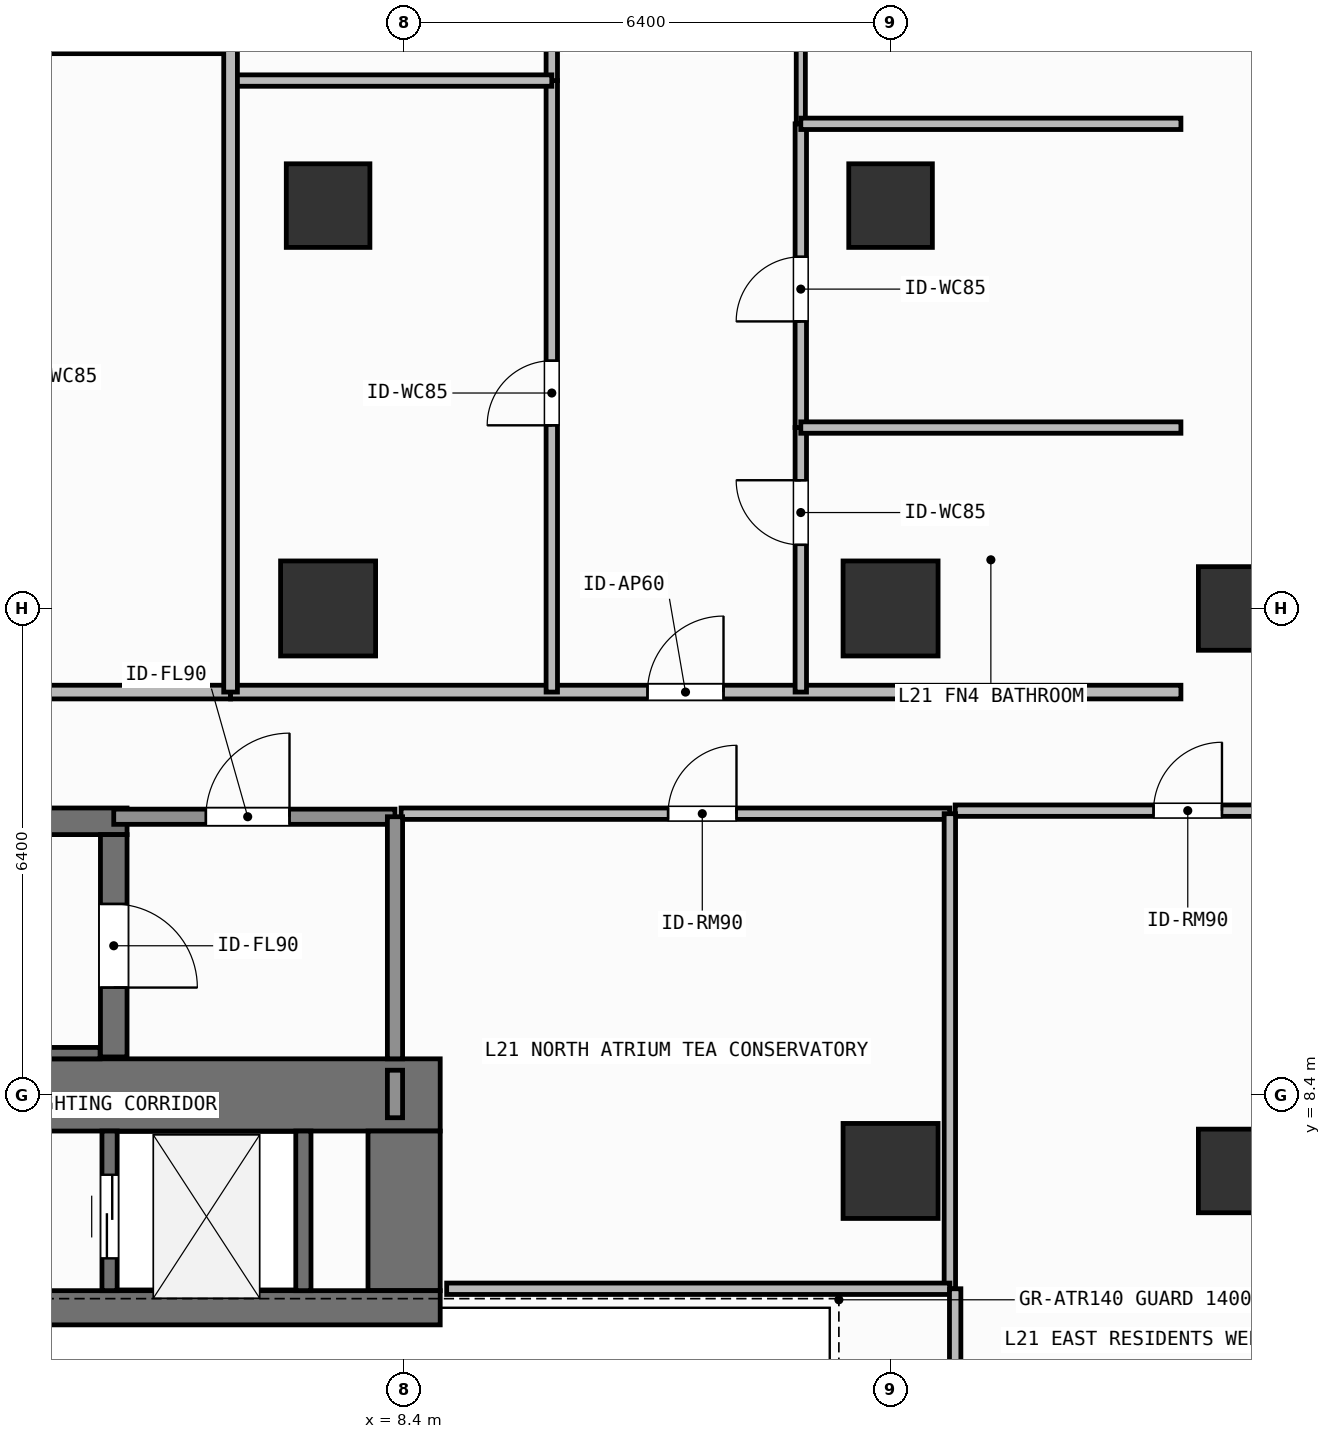
"""IFC4 building model, lengths in metres.
Left out: names, types, materials, properties, quantities, classifications, styles, units other than length and angle.
Written with IfcOpenShell. Run it as: python <this file> out.ifc"""

import sys

from ifc_helpers import new_model, si_unit, direction, frame, frame_2d, origin, origin_2d, place, context, subcontext, project, spatial, rectangle, extrude, element, fill, save


model = new_model("IFC4")
c1 = context("Model", 3, precision=1e-05, world=origin(), true_north=direction((0.0, 1.0)))
c2 = subcontext(c1, "Body", "Model", "MODEL_VIEW")
j1 = project(units=[si_unit("LENGTHUNIT", "METRE"), si_unit("PLANEANGLEUNIT", "RADIAN")], contexts=[c1])
p1 = place(None, origin())
s1 = spatial("IfcSite", under=j1, at=p1, CompositionType="ELEMENT")
p2 = place(p1, origin())
s2 = spatial("IfcBuilding", under=s1, at=p2, CompositionType="ELEMENT")
p3 = place(p2, frame((0.0, 0.0, 85.2)))
s3 = spatial("IfcBuildingStorey", under=s2, at=p3, CompositionType="ELEMENT", Elevation=85.2)
p4 = place(p3, frame((-7.55, 8.4, 0.0), z_axis=(0.0, 0.0, 1.0), x_axis=(1.0, 0.0, 0.0)))
e1 = element("IfcWall", 1, at=p4, inside=s3, PredefinedType="SHEAR", context=c2, shape_type="SweptSolid", body=[
    extrude(rectangle(XDim=16.425, YDim=0.95, at=frame_2d((8.212, 0.0))), origin(), (0.0, 0.0, 1.0), 3.9),
])
p5 = place(p3, frame((8.4, 5.825, 0.0), z_axis=(0.0, 0.0, 1.0), x_axis=(0.0, 1.0, 0.0)))
e2 = element("IfcWall", 2, at=p5, inside=s3, PredefinedType="SHEAR", context=c2, shape_type="SweptSolid", body=[
    extrude(rectangle(XDim=2.1, YDim=0.95, at=frame_2d((1.05, 0.0))), origin(), (0.0, 0.0, 1.0), 3.9),
])
p6 = place(p3, frame((3.045, 5.6, 0.0), z_axis=(0.0, 0.0, 1.0), x_axis=(1.0, 0.0, 0.0)))
e3 = element("IfcWall", 3, at=p6, inside=s3, PredefinedType="SHEAR", context=c2, shape_type="SweptSolid", body=[
    extrude(rectangle(XDim=5.83, YDim=0.45, at=frame_2d((2.915, 0.0))), origin(), (0.0, 0.0, 1.0), 3.9),
])
p7 = place(p3, frame((-2.555, 12.0, 0.0), z_axis=(0.0, 0.0, 1.0), x_axis=(1.0, 0.0, 0.0)))
e4 = element("IfcWall", 4, at=p7, inside=s3, PredefinedType="SHEAR", context=c2, shape_type="SweptSolid", body=[
    extrude(rectangle(XDim=7.31, YDim=0.35, at=frame_2d((3.655, 0.0))), origin(), (0.0, 0.0, 1.0), 3.9),
])
p8 = place(p3, frame((-2.2, 8.95, 0.0), z_axis=(0.0, 0.0, 1.0), x_axis=(1.0, 0.0, 0.0)))
e5 = element("IfcWall", 5, at=p8, inside=s3, PredefinedType="SHEAR", context=c2, shape_type="SweptSolid", body=[
    extrude(rectangle(XDim=6.6, YDim=0.15, at=frame_2d((3.3, 0.0))), origin(), (0.0, 0.0, 1.0), 3.9),
])
p9 = place(p3, frame((4.58, 11.825, 0.0), z_axis=(0.0, 0.0, 1.0), x_axis=(0.0, -1.0, 0.0)))
e6 = element("IfcWall", 6, at=p9, inside=s3, PredefinedType="SHEAR", context=c2, shape_type="SweptSolid", body=[
    extrude(rectangle(XDim=2.925, YDim=0.35, at=frame_2d((1.462, 0.0))), origin(), (0.0, 0.0, 1.0), 3.9),
])
p10 = place(p9, frame((0.913, 0.0, 0.0)))
e7 = element("IfcOpeningElement", 7, at=p10, cuts=e6, PredefinedType="OPENING", context=c2, shape_type="SweptSolid", body=[
    extrude(rectangle(XDim=1.1, YDim=2.15, at=frame_2d((0.55, 1.075))), frame((0.0, 0.185, 0.0), z_axis=(0.0, -1.0, 0.0), x_axis=(1.0, 0.0, 0.0)), (0.0, 0.0, 1.0), 0.37),
])
for number, where, z_axis, x_axis in (
    (8, (7.4, 14.8, 0.0), (0.0, 0.0, 1.0), (1.0, 0.0, 0.0)),
    (9, (14.8, 14.8, 0.0), (0.0, 0.0, 1.0), (1.0, 0.0, 0.0)),
    (10, (14.8, 7.4, 0.0), (0.0, 0.0, 1.0), (1.0, 0.0, 0.0)),
):
    element("IfcColumn", number, at=place(p3, frame(where, z_axis=z_axis, x_axis=x_axis)), inside=s3, PredefinedType="COLUMN", context=c2, shape_type="SweptSolid", body=[
        extrude(rectangle(XDim=1.25, YDim=1.25, at=origin_2d()), origin(), (0.0, 0.0, 1.0), 3.9),
    ])
for number, where, z_axis, x_axis in (
    (11, (19.4, 7.4, 0.0), (0.0, 0.0, 1.0), (1.0, 0.0, 0.0)),
    (12, (19.4, 14.8, 0.0), (0.0, 0.0, 1.0), (1.0, 0.0, 0.0)),
    (13, (7.4, 20.1, 0.0), (0.0, 0.0, 1.0), (1.0, 0.0, 0.0)),
    (14, (14.8, 20.1, 0.0), (0.0, 0.0, 1.0), (1.0, 0.0, 0.0)),
):
    element("IfcColumn", number, at=place(p3, frame(where, z_axis=z_axis, x_axis=x_axis)), inside=s3, PredefinedType="COLUMN", context=c2, shape_type="SweptSolid", body=[
        extrude(rectangle(XDim=1.1, YDim=1.1, at=origin_2d()), origin(), (0.0, 0.0, 1.0), 3.9),
    ])
p11 = place(p3, frame((4.525, 5.825, 0.0), z_axis=(0.0, 0.0, 1.0), x_axis=(0.0, 1.0, 0.0)))
e15 = element("IfcWall", 15, at=p11, inside=s3, PredefinedType="SHEAR", context=c2, shape_type="SweptSolid", body=[
    extrude(rectangle(XDim=2.1, YDim=0.2, at=frame_2d((1.05, 0.0))), origin(), (0.0, 0.0, 1.0), 3.68),
])
p12 = place(p11, frame((0.425, 0.0, 0.0)))
e16 = element("IfcOpeningElement", 16, at=p12, cuts=e15, PredefinedType="OPENING", context=c2, shape_type="SweptSolid", body=[
    extrude(rectangle(XDim=1.1, YDim=2.2, at=frame_2d((0.55, 1.1))), frame((0.0, 0.11, 0.0), z_axis=(0.0, -1.0, 0.0), x_axis=(1.0, 0.0, 0.0)), (0.0, 0.0, 1.0), 0.22),
])
p13 = place(p3, frame((7.075, 5.825, 0.0), z_axis=(0.0, 0.0, 1.0), x_axis=(0.0, 1.0, 0.0)))
e17 = element("IfcWall", 17, at=p13, inside=s3, PredefinedType="SHEAR", context=c2, shape_type="SweptSolid", body=[
    extrude(rectangle(XDim=2.1, YDim=0.2, at=frame_2d((1.05, 0.0))), origin(), (0.0, 0.0, 1.0), 3.68),
])
p14 = place(p3, frame((4.58, 12.06, 0.0), z_axis=(0.0, 0.0, 1.0), x_axis=(1.0, 0.0, 0.0)))
e18 = element("IfcWall", 18, at=p14, inside=s3, PredefinedType="SOLIDWALL", context=c2, shape_type="SweptSolid", body=[
    extrude(rectangle(XDim=3.7, YDim=0.2, at=frame_2d((1.85, 0.0))), origin(), (0.0, 0.0, 1.0), 3.68),
])
p15 = place(p14, frame((1.212, 0.0, 0.0)))
e19 = element("IfcOpeningElement", 19, at=p15, cuts=e18, PredefinedType="OPENING", context=c2, shape_type="SweptSolid", body=[
    extrude(rectangle(XDim=1.1, YDim=2.15, at=frame_2d((0.55, 1.075))), frame((0.0, 0.11, 0.0), z_axis=(0.0, -1.0, 0.0), x_axis=(1.0, 0.0, 0.0)), (0.0, 0.0, 1.0), 0.22),
])
p16 = place(p3, frame((8.36, 12.1, 0.0), z_axis=(0.0, 0.0, 1.0), x_axis=(1.0, 0.0, 0.0)))
e20 = element("IfcWall", 20, at=p16, inside=s3, PredefinedType="PARTITIONING", context=c2, shape_type="SweptSolid", body=[
    extrude(rectangle(XDim=7.22, YDim=0.15, at=frame_2d((3.61, 0.0))), origin(), (0.0, 0.0, 1.0), 3.68),
])
p17 = place(p16, frame((3.513, 0.0, 0.0)))
e21 = element("IfcOpeningElement", 21, at=p17, cuts=e20, PredefinedType="OPENING", context=c2, shape_type="SweptSolid", body=[
    extrude(rectangle(XDim=0.9, YDim=2.1, at=frame_2d((0.45, 1.05))), frame((0.0, 0.085, 0.0), z_axis=(0.0, -1.0, 0.0), x_axis=(1.0, 0.0, 0.0)), (0.0, 0.0, 1.0), 0.17),
])
p18 = place(p3, frame((-2.9, 13.7, 0.0), z_axis=(0.0, 0.0, 1.0), x_axis=(1.0, 0.0, 0.0)))
e22 = element("IfcWall", 22, at=p18, inside=s3, PredefinedType="PARTITIONING", context=c2, shape_type="SweptSolid", body=[
    extrude(rectangle(XDim=9.017, YDim=0.18, at=frame_2d((4.508, 0.0))), origin(), (0.0, 0.0, 1.0), 3.68),
])
p19 = place(p18, frame((1.234, 0.0, 0.0)))
e23 = element("IfcOpeningElement", 23, at=p19, cuts=e22, PredefinedType="OPENING", context=c2, shape_type="SweptSolid", body=[
    extrude(rectangle(XDim=1.0, YDim=2.2, at=frame_2d((0.5, 1.1))), frame((0.0, 0.1, 0.0), z_axis=(0.0, -1.0, 0.0), x_axis=(1.0, 0.0, 0.0)), (0.0, 0.0, 1.0), 0.2),
])
p20 = place(p3, frame((6.117, 13.7, 0.0), z_axis=(0.0, 0.0, 1.0), x_axis=(1.0, 0.0, 0.0)))
e24 = element("IfcWall", 24, at=p20, inside=s3, PredefinedType="PARTITIONING", context=c2, shape_type="SweptSolid", body=[
    extrude(rectangle(XDim=12.503, YDim=0.18, at=frame_2d((6.251, 0.0))), origin(), (0.0, 0.0, 1.0), 3.68),
])
p21 = place(p20, frame((5.485, 0.0, 0.0)))
e25 = element("IfcOpeningElement", 25, at=p21, cuts=e24, PredefinedType="OPENING", context=c2, shape_type="SweptSolid", body=[
    extrude(rectangle(XDim=1.0, YDim=2.2, at=frame_2d((0.5, 1.1))), frame((0.0, 0.1, 0.0), z_axis=(0.0, -1.0, 0.0), x_axis=(1.0, 0.0, 0.0)), (0.0, 0.0, 1.0), 0.2),
])
p22 = place(p3, frame((10.343, 13.7, 0.0), z_axis=(0.0, 0.0, 1.0), x_axis=(0.0, 1.0, 0.0)))
e26 = element("IfcWall", 26, at=p22, inside=s3, PredefinedType="PARTITIONING", context=c2, shape_type="SweptSolid", body=[
    extrude(rectangle(XDim=8.045, YDim=0.15, at=frame_2d((4.022, 0.0))), origin(), (0.0, 0.0, 1.0), 3.68),
])
p23 = place(p22, frame((3.51, 0.0, 0.0)))
e27 = element("IfcOpeningElement", 27, at=p23, cuts=e26, PredefinedType="OPENING", context=c2, shape_type="SweptSolid", body=[
    extrude(rectangle(XDim=0.85, YDim=2.1, at=frame_2d((0.425, 1.05))), frame((0.0, 0.085, 0.0), z_axis=(0.0, -1.0, 0.0), x_axis=(1.0, 0.0, 0.0)), (0.0, 0.0, 1.0), 0.17),
])
p24 = place(p3, frame((10.343, 21.745, 0.0), z_axis=(0.0, 0.0, 1.0), x_axis=(0.0, 1.0, 0.0)))
e28 = element("IfcWall", 28, at=p24, inside=s3, PredefinedType="PARTITIONING", context=c2, shape_type="SweptSolid", body=[
    extrude(rectangle(XDim=4.845, YDim=0.15, at=frame_2d((2.422, 0.0))), origin(), (0.0, 0.0, 1.0), 3.68),
])
p25 = place(p24, frame((1.91, 0.0, 0.0)))
e29 = element("IfcOpeningElement", 29, at=p25, cuts=e28, PredefinedType="OPENING", context=c2, shape_type="SweptSolid", body=[
    extrude(rectangle(XDim=0.85, YDim=2.1, at=frame_2d((0.425, 1.05))), frame((0.0, 0.085, 0.0), z_axis=(0.0, -1.0, 0.0), x_axis=(1.0, 0.0, 0.0)), (0.0, 0.0, 1.0), 0.17),
])
p26 = place(p3, frame((13.619, 13.7, 0.0), z_axis=(0.0, 0.0, 1.0), x_axis=(0.0, 1.0, 0.0)))
e30 = element("IfcWall", 30, at=p26, inside=s3, PredefinedType="PARTITIONING", context=c2, shape_type="SweptSolid", body=[
    extrude(rectangle(XDim=3.48, YDim=0.15, at=frame_2d((1.74, 0.0))), origin(), (0.0, 0.0, 1.0), 3.68),
])
p27 = place(p26, frame((1.937, 0.0, 0.0)))
e31 = element("IfcOpeningElement", 31, at=p27, cuts=e30, PredefinedType="OPENING", context=c2, shape_type="SweptSolid", body=[
    extrude(rectangle(XDim=0.85, YDim=2.1, at=frame_2d((0.425, 1.05))), frame((0.0, 0.085, 0.0), z_axis=(0.0, -1.0, 0.0), x_axis=(1.0, 0.0, 0.0)), (0.0, 0.0, 1.0), 0.17),
])
p28 = place(p3, frame((13.619, 17.18, 0.0), z_axis=(0.0, 0.0, 1.0), x_axis=(0.0, 1.0, 0.0)))
e32 = element("IfcWall", 32, at=p28, inside=s3, PredefinedType="PARTITIONING", context=c2, shape_type="SweptSolid", body=[
    extrude(rectangle(XDim=3.996, YDim=0.15, at=frame_2d((1.998, 0.0))), origin(), (0.0, 0.0, 1.0), 3.68),
])
p29 = place(p28, frame((1.396, 0.0, 0.0)))
e33 = element("IfcOpeningElement", 33, at=p29, cuts=e32, PredefinedType="OPENING", context=c2, shape_type="SweptSolid", body=[
    extrude(rectangle(XDim=0.85, YDim=2.1, at=frame_2d((0.425, 1.05))), frame((0.0, 0.085, 0.0), z_axis=(0.0, -1.0, 0.0), x_axis=(1.0, 0.0, 0.0)), (0.0, 0.0, 1.0), 0.17),
])
p30 = place(p3, frame((13.619, 21.176, 0.0), z_axis=(0.0, 0.0, 1.0), x_axis=(0.0, 1.0, 0.0)))
e34 = element("IfcWall", 34, at=p30, inside=s3, PredefinedType="PARTITIONING", context=c2, shape_type="SweptSolid", body=[
    extrude(rectangle(XDim=5.414, YDim=0.12, at=frame_2d((2.707, 0.0))), origin(), (0.0, 0.0, 1.0), 3.68),
])
p31 = place(p30, frame((2.282, 0.0, 0.0)))
e35 = element("IfcOpeningElement", 35, at=p31, cuts=e34, PredefinedType="OPENING", context=c2, shape_type="SweptSolid", body=[
    extrude(rectangle(XDim=0.85, YDim=2.1, at=frame_2d((0.425, 1.05))), frame((0.0, 0.07, 0.0), z_axis=(0.0, -1.0, 0.0), x_axis=(1.0, 0.0, 0.0)), (0.0, 0.0, 1.0), 0.14),
])
p32 = place(p3, frame((15.65, 12.14, 0.0), z_axis=(0.0, 0.0, 1.0), x_axis=(1.0, 0.0, 0.0)))
e36 = element("IfcWall", 36, at=p32, inside=s3, PredefinedType="PARTITIONING", context=c2, shape_type="SweptSolid", body=[
    extrude(rectangle(XDim=6.47, YDim=0.15, at=frame_2d((3.235, 0.0))), origin(), (0.0, 0.0, 1.0), 3.68),
])
p33 = place(p32, frame((2.61, 0.0, 0.0)))
e37 = element("IfcOpeningElement", 37, at=p33, cuts=e36, PredefinedType="OPENING", context=c2, shape_type="SweptSolid", body=[
    extrude(rectangle(XDim=0.9, YDim=2.1, at=frame_2d((0.45, 1.05))), frame((0.0, 0.085, 0.0), z_axis=(0.0, -1.0, 0.0), x_axis=(1.0, 0.0, 0.0)), (0.0, 0.0, 1.0), 0.17),
])
p34 = place(p3, frame((8.28, 8.875, 0.0), z_axis=(0.0, 0.0, 1.0), x_axis=(0.0, 1.0, 0.0)))
e38 = element("IfcWall", 38, at=p34, inside=s3, PredefinedType="SOLIDWALL", context=c2, shape_type="SweptSolid", body=[
    extrude(rectangle(XDim=3.185, YDim=0.2, at=frame_2d((1.593, 0.0))), origin(), (0.0, 0.0, 1.0), 3.68),
])
p35 = place(p3, frame((8.28, 8.1, 0.0), z_axis=(0.0, 0.0, 1.0), x_axis=(0.0, 1.0, 0.0)))
e39 = element("IfcWall", 39, at=p35, inside=s3, PredefinedType="SOLIDWALL", context=c2, shape_type="SweptSolid", body=[
    extrude(rectangle(XDim=0.625, YDim=0.2, at=frame_2d((0.312, 0.0))), origin(), (0.0, 0.0, 1.0), 3.68),
])
p36 = place(p3, frame((15.58, 5.85, 0.0), z_axis=(0.0, 0.0, 1.0), x_axis=(0.0, 1.0, 0.0)))
e40 = element("IfcWall", 40, at=p36, inside=s3, PredefinedType="PARTITIONING", context=c2, shape_type="SweptSolid", body=[
    extrude(rectangle(XDim=6.25, YDim=0.15, at=frame_2d((3.125, 0.0))), origin(), (0.0, 0.0, 1.0), 3.68),
])
p37 = place(p3, frame((8.96, 5.85, 0.0), z_axis=(0.0, 0.0, 1.0), x_axis=(1.0, 0.0, 0.0)))
e41 = element("IfcWall", 41, at=p37, inside=s3, PredefinedType="PARTITIONING", context=c2, shape_type="SweptSolid", body=[
    extrude(rectangle(XDim=6.62, YDim=0.15, at=frame_2d((3.31, 0.0))), origin(), (0.0, 0.0, 1.0), 3.68),
])
p38 = place(p3, frame((1.928, 22.174, 0.0), z_axis=(0.0, 0.0, 1.0), x_axis=(1.0, 0.0, 0.0)))
e42 = element("IfcWall", 42, at=p38, inside=s3, PredefinedType="PARTITIONING", context=c2, shape_type="SweptSolid", body=[
    extrude(rectangle(XDim=4.189, YDim=0.15, at=frame_2d((2.094, 0.0))), origin(), (0.0, 0.0, 1.0), 3.68),
])
p39 = place(p3, frame((6.117, 21.745, 0.0), z_axis=(0.0, 0.0, 1.0), x_axis=(1.0, 0.0, 0.0)))
e43 = element("IfcWall", 43, at=p39, inside=s3, PredefinedType="PARTITIONING", context=c2, shape_type="SweptSolid", body=[
    extrude(rectangle(XDim=4.226, YDim=0.15, at=frame_2d((2.113, 0.0))), origin(), (0.0, 0.0, 1.0), 3.68),
])
for number, where, z_axis, x_axis in (
    (44, (13.619, 17.18, 0.0), (0.0, 0.0, 1.0), (1.0, 0.0, 0.0)),
    (45, (13.619, 21.176, 0.0), (0.0, 0.0, 1.0), (1.0, 0.0, 0.0)),
):
    element("IfcWall", number, at=place(p3, frame(where, z_axis=z_axis, x_axis=x_axis)), inside=s3, PredefinedType="PARTITIONING", context=c2, shape_type="SweptSolid", body=[
        extrude(rectangle(XDim=5.001, YDim=0.15, at=frame_2d((2.5, 0.0))), origin(), (0.0, 0.0, 1.0), 3.68),
    ])
p40 = place(p3, frame((6.117, 13.7, 0.0), z_axis=(0.0, 0.0, 1.0), x_axis=(0.0, 1.0, 0.0)))
e46 = element("IfcWall", 46, at=p40, inside=s3, PredefinedType="PARTITIONING", context=c2, shape_type="SweptSolid", body=[
    extrude(rectangle(XDim=17.13, YDim=0.18, at=frame_2d((8.565, 0.0))), origin(), (0.0, 0.0, 1.0), 3.68),
])
p41 = place(p3, frame((15.65, -1.8, 0.0), z_axis=(0.0, 0.0, 1.0), x_axis=(0.0, 1.0, 0.0)))
e47 = element("IfcWall", 47, at=p41, inside=s3, PredefinedType="PARTITIONING", context=c2, shape_type="SweptSolid", body=[
    extrude(rectangle(XDim=7.65, YDim=0.15, at=frame_2d((3.825, 0.0))), origin(), (0.0, 0.0, 1.0), 3.68),
])
p42 = place(p12, origin())
e48 = element("IfcDoor", 48, at=p42, inside=s3, OperationType="SLIDING_TO_LEFT", PredefinedType="DOOR", context=c2, shape_type="SweptSolid", body=[
    extrude(rectangle(XDim=1.1, YDim=2.2, at=frame_2d((0.55, 1.1))), frame((0.0, 0.025, 0.0), z_axis=(0.0, -1.0, 0.0), x_axis=(1.0, 0.0, 0.0)), (0.0, 0.0, 1.0), 0.05),
])
fill(e16, e48)
p43 = place(p10, origin())
e49 = element("IfcDoor", 49, at=p43, inside=s3, OperationType="SINGLE_SWING_RIGHT", PredefinedType="DOOR", context=c2, shape_type="SweptSolid", body=[
    extrude(rectangle(XDim=1.1, YDim=2.15, at=frame_2d((0.55, 1.075))), frame((0.0, 0.025, 0.0), z_axis=(0.0, -1.0, 0.0), x_axis=(1.0, 0.0, 0.0)), (0.0, 0.0, 1.0), 0.05),
])
fill(e7, e49)
p44 = place(p15, origin())
e50 = element("IfcDoor", 50, at=p44, inside=s3, OperationType="SINGLE_SWING_RIGHT", PredefinedType="DOOR", context=c2, shape_type="SweptSolid", body=[
    extrude(rectangle(XDim=1.1, YDim=2.15, at=frame_2d((0.55, 1.075))), frame((0.0, 0.025, 0.0), z_axis=(0.0, -1.0, 0.0), x_axis=(1.0, 0.0, 0.0)), (0.0, 0.0, 1.0), 0.05),
])
fill(e19, e50)
p45 = place(p17, origin())
e51 = element("IfcDoor", 51, at=p45, inside=s3, OperationType="SINGLE_SWING_RIGHT", PredefinedType="DOOR", context=c2, shape_type="SweptSolid", body=[
    extrude(rectangle(XDim=0.9, YDim=2.1, at=frame_2d((0.45, 1.05))), frame((0.0, 0.025, 0.0), z_axis=(0.0, -1.0, 0.0), x_axis=(1.0, 0.0, 0.0)), (0.0, 0.0, 1.0), 0.05),
])
fill(e21, e51)
p46 = place(p21, origin())
e52 = element("IfcDoor", 52, at=p46, inside=s3, OperationType="SINGLE_SWING_RIGHT", PredefinedType="DOOR", context=c2, shape_type="SweptSolid", body=[
    extrude(rectangle(XDim=1.0, YDim=2.2, at=frame_2d((0.5, 1.1))), frame((0.0, 0.025, 0.0), z_axis=(0.0, -1.0, 0.0), x_axis=(1.0, 0.0, 0.0)), (0.0, 0.0, 1.0), 0.05),
])
fill(e25, e52)
p47 = place(p23, origin())
e53 = element("IfcDoor", 53, at=p47, inside=s3, OperationType="SINGLE_SWING_LEFT", PredefinedType="DOOR", context=c2, shape_type="SweptSolid", body=[
    extrude(rectangle(XDim=0.85, YDim=2.1, at=frame_2d((0.425, 1.05))), frame((0.0, 0.025, 0.0), z_axis=(0.0, -1.0, 0.0), x_axis=(1.0, 0.0, 0.0)), (0.0, 0.0, 1.0), 0.05),
])
fill(e27, e53)
p48 = place(p27, origin())
e54 = element("IfcDoor", 54, at=p48, inside=s3, OperationType="SINGLE_SWING_RIGHT", PredefinedType="DOOR", context=c2, shape_type="SweptSolid", body=[
    extrude(rectangle(XDim=0.85, YDim=2.1, at=frame_2d((0.425, 1.05))), frame((0.0, 0.025, 0.0), z_axis=(0.0, -1.0, 0.0), x_axis=(1.0, 0.0, 0.0)), (0.0, 0.0, 1.0), 0.05),
])
fill(e31, e54)
p49 = place(p29, origin())
e55 = element("IfcDoor", 55, at=p49, inside=s3, OperationType="SINGLE_SWING_LEFT", PredefinedType="DOOR", context=c2, shape_type="SweptSolid", body=[
    extrude(rectangle(XDim=0.85, YDim=2.1, at=frame_2d((0.425, 1.05))), frame((0.0, 0.025, 0.0), z_axis=(0.0, -1.0, 0.0), x_axis=(1.0, 0.0, 0.0)), (0.0, 0.0, 1.0), 0.05),
])
fill(e33, e55)
p50 = place(p33, origin())
e56 = element("IfcDoor", 56, at=p50, inside=s3, OperationType="SINGLE_SWING_RIGHT", PredefinedType="DOOR", context=c2, shape_type="SweptSolid", body=[
    extrude(rectangle(XDim=0.9, YDim=2.1, at=frame_2d((0.45, 1.05))), frame((0.0, 0.025, 0.0), z_axis=(0.0, -1.0, 0.0), x_axis=(1.0, 0.0, 0.0)), (0.0, 0.0, 1.0), 0.05),
])
fill(e37, e56)
save(model, sys.argv[1])
